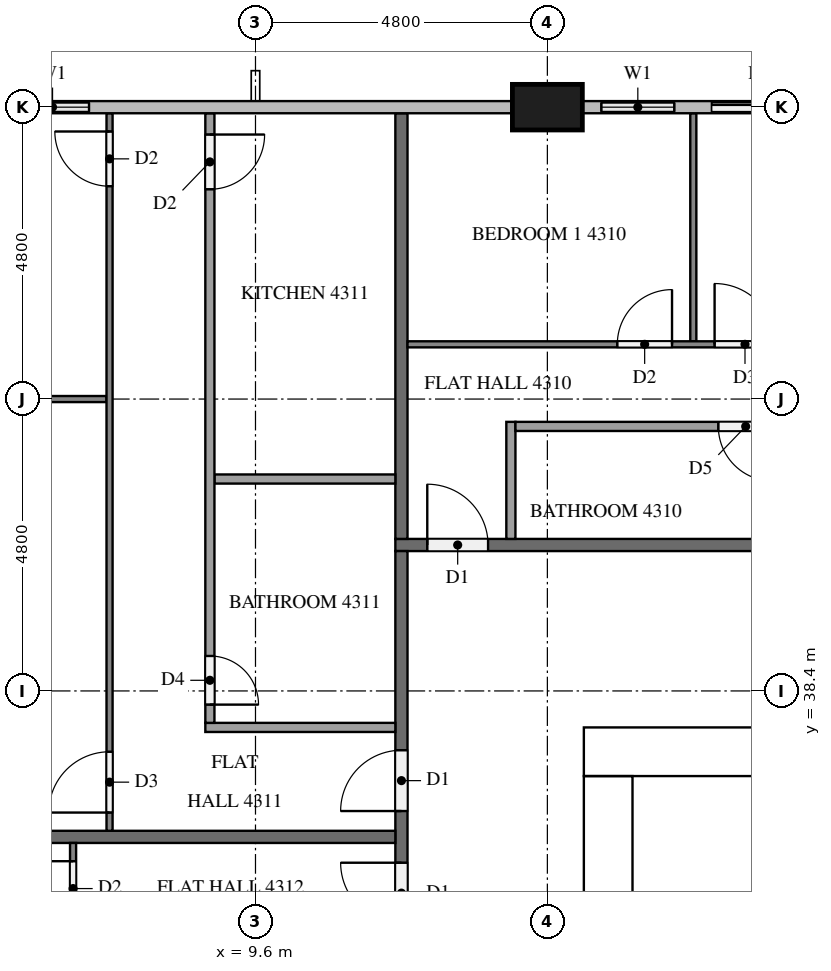
"""IFC4 building model, lengths in metres.
Left out: names, types, materials, properties, quantities, classifications, styles, units other than length and angle.
Written with IfcOpenShell. Run it as: python <this file> out.ifc"""

import sys

from ifc_helpers import new_model, si_unit, direction, frame, frame_2d, origin, origin_2d, place, context, subcontext, project, spatial, rectangle, extrude, element, fill, save


model = new_model("IFC4")
c1 = context("Model", 3, precision=1e-05, world=origin(), true_north=direction((0.0, 1.0)))
c2 = subcontext(c1, "Body", "Model", "MODEL_VIEW")
j1 = project(units=[si_unit("LENGTHUNIT", "METRE"), si_unit("PLANEANGLEUNIT", "RADIAN")], contexts=[c1])
p1 = place(None, origin())
s1 = spatial("IfcSite", under=j1, at=p1, CompositionType="ELEMENT")
p2 = place(p1, origin())
s2 = spatial("IfcBuilding", under=s1, at=p2, CompositionType="ELEMENT")
p3 = place(p2, frame((0.0, 0.0, 166.5)))
s3 = spatial("IfcBuildingStorey", under=s2, at=p3, CompositionType="ELEMENT", Elevation=166.5)
p4 = place(p3, frame((15.0, 37.4, 0.0), z_axis=(0.0, 0.0, 1.0), x_axis=(1.0, 0.0, 0.0)))
e1 = element("IfcWall", 1, at=p4, inside=s3, PredefinedType="SHEAR", context=c2, shape_type="SweptSolid", body=[
    extrude(rectangle(XDim=32.4, YDim=0.8, at=frame_2d((16.2, 0.0))), origin(), (0.0, 0.0, 1.0), 3.2),
])
p5 = place(p4, frame((15.3, 0.0, 0.0)))
e2 = element("IfcOpeningElement", 2, at=p5, cuts=e1, PredefinedType="OPENING", context=c2, shape_type="SweptSolid", body=[
    extrude(rectangle(XDim=1.8, YDim=2.1, at=frame_2d((0.9, 1.05))), frame((0.0, 0.41, 0.0), z_axis=(0.0, -1.0, 0.0), x_axis=(1.0, 0.0, 0.0)), (0.0, 0.0, 1.0), 0.82),
])
p6 = place(p4, frame((1.51, 0.0, 0.0)))
e3 = element("IfcOpeningElement", 3, at=p6, cuts=e1, PredefinedType="OPENING", context=c2, shape_type="SweptSolid", body=[
    extrude(rectangle(XDim=1.0, YDim=2.1, at=frame_2d((0.5, 1.05))), frame((0.0, 0.41, 0.0), z_axis=(0.0, -1.0, 0.0), x_axis=(1.0, 0.0, 0.0)), (0.0, 0.0, 1.0), 0.82),
])
p7 = place(p4, frame((5.11, 0.0, 0.0)))
e4 = element("IfcOpeningElement", 4, at=p7, cuts=e1, PredefinedType="OPENING", context=c2, shape_type="SweptSolid", body=[
    extrude(rectangle(XDim=1.0, YDim=2.1, at=frame_2d((0.5, 1.05))), frame((0.0, 0.41, 0.0), z_axis=(0.0, -1.0, 0.0), x_axis=(1.0, 0.0, 0.0)), (0.0, 0.0, 1.0), 0.82),
])
p8 = place(p3, frame((15.4, 15.8, 0.0), z_axis=(0.0, 0.0, 1.0), x_axis=(0.0, 1.0, 0.0)))
e5 = element("IfcWall", 5, at=p8, inside=s3, PredefinedType="SHEAR", context=c2, shape_type="SweptSolid", body=[
    extrude(rectangle(XDim=21.2, YDim=0.8, at=frame_2d((10.6, 0.0))), origin(), (0.0, 0.0, 1.0), 3.2),
])
p9 = place(p8, frame((4.96, 0.0, 0.0)))
e6 = element("IfcOpeningElement", 6, at=p9, cuts=e5, PredefinedType="OPENING", context=c2, shape_type="SweptSolid", body=[
    extrude(rectangle(XDim=1.2, YDim=2.1, at=frame_2d((0.6, 1.05))), frame((0.0, 0.41, 0.0), z_axis=(0.0, -1.0, 0.0), x_axis=(1.0, 0.0, 0.0)), (0.0, 0.0, 1.0), 0.82),
])
p10 = place(p3, frame((14.4, 48.0, 0.0), z_axis=(0.0, 0.0, 1.0), x_axis=(1.0, 0.0, 0.0)))
e7 = element("IfcColumn", 7, at=p10, inside=s3, PredefinedType="COLUMN", context=c2, shape_type="SweptSolid", body=[
    extrude(rectangle(XDim=1.15, YDim=0.75, at=origin_2d()), origin(), (0.0, 0.0, 1.0), 3.2),
])
p11 = place(p3, frame((19.2, 48.0, 0.0), z_axis=(0.0, 0.0, 1.0), x_axis=(-1.0, 0.0, 0.0)))
e8 = element("IfcWall", 8, at=p11, inside=s3, PredefinedType="SOLIDWALL", context=c2, shape_type="SweptSolid", body=[
    extrude(rectangle(XDim=4.225, YDim=0.15, at=frame_2d((2.112, 0.0))), origin(), (0.0, 0.0, 1.0), 3.2),
])
p12 = place(p11, frame((0.3, 0.0, 0.0)))
e9 = element("IfcOpeningElement", 9, at=p12, cuts=e8, PredefinedType="OPENING", context=c2, shape_type="SweptSolid", body=[
    extrude(rectangle(XDim=1.8, YDim=2.4, at=frame_2d((0.9, 1.2))), frame((0.0, 0.085, 0.0), z_axis=(0.0, -1.0, 0.0), x_axis=(1.0, 0.0, 0.0)), (0.0, 0.0, 1.0), 0.17),
])
p13 = place(p11, frame((2.712, 0.0, 0.9)))
e10 = element("IfcOpeningElement", 10, at=p13, cuts=e8, PredefinedType="OPENING", context=c2, shape_type="SweptSolid", body=[
    extrude(rectangle(XDim=1.2, YDim=1.4, at=frame_2d((0.6, 0.7))), frame((0.0, 0.085, 0.0), z_axis=(0.0, -1.0, 0.0), x_axis=(1.0, 0.0, 0.0)), (0.0, 0.0, 1.0), 0.17),
])
p14 = place(p3, frame((7.2, 48.0, 0.0), z_axis=(0.0, 0.0, 1.0), x_axis=(-1.0, 0.0, 0.0)))
e11 = element("IfcWall", 11, at=p14, inside=s3, PredefinedType="SOLIDWALL", context=c2, shape_type="SweptSolid", body=[
    extrude(rectangle(XDim=1.875, YDim=0.15, at=frame_2d((0.938, 0.0))), origin(), (0.0, 0.0, 1.0), 3.2),
])
p15 = place(p14, frame((0.337, 0.0, 0.9)))
e12 = element("IfcOpeningElement", 12, at=p15, cuts=e11, PredefinedType="OPENING", context=c2, shape_type="SweptSolid", body=[
    extrude(rectangle(XDim=1.2, YDim=1.4, at=frame_2d((0.6, 0.7))), frame((0.0, 0.085, 0.0), z_axis=(0.0, -1.0, 0.0), x_axis=(1.0, 0.0, 0.0)), (0.0, 0.0, 1.0), 0.17),
])
p16 = place(p3, frame((11.9, 40.8, 0.0), z_axis=(0.0, 0.0, 1.0), x_axis=(1.0, 0.0, 0.0)))
e13 = element("IfcWall", 13, at=p16, inside=s3, PredefinedType="PARTITIONING", context=c2, shape_type="SweptSolid", body=[
    extrude(rectangle(XDim=38.6, YDim=0.2, at=frame_2d((19.3, 0.0))), origin(), (0.0, 0.0, 1.0), 3.2),
])
p17 = place(p16, frame((31.725, 0.0, 0.0)))
e14 = element("IfcOpeningElement", 14, at=p17, cuts=e13, PredefinedType="OPENING", context=c2, shape_type="SweptSolid", body=[
    extrude(rectangle(XDim=1.0, YDim=2.1, at=frame_2d((0.5, 1.05))), frame((0.0, 0.11, 0.0), z_axis=(0.0, -1.0, 0.0), x_axis=(1.0, 0.0, 0.0)), (0.0, 0.0, 1.0), 0.22),
])
p18 = place(p16, frame((17.325, 0.0, 0.0)))
e15 = element("IfcOpeningElement", 15, at=p18, cuts=e13, PredefinedType="OPENING", context=c2, shape_type="SweptSolid", body=[
    extrude(rectangle(XDim=1.0, YDim=2.1, at=frame_2d((0.5, 1.05))), frame((0.0, 0.11, 0.0), z_axis=(0.0, -1.0, 0.0), x_axis=(1.0, 0.0, 0.0)), (0.0, 0.0, 1.0), 0.22),
])
p19 = place(p16, frame((0.525, 0.0, 0.0)))
e16 = element("IfcOpeningElement", 16, at=p19, cuts=e13, PredefinedType="OPENING", context=c2, shape_type="SweptSolid", body=[
    extrude(rectangle(XDim=1.0, YDim=2.1, at=frame_2d((0.5, 1.05))), frame((0.0, 0.11, 0.0), z_axis=(0.0, -1.0, 0.0), x_axis=(1.0, 0.0, 0.0)), (0.0, 0.0, 1.0), 0.22),
])
p20 = place(p3, frame((12.0, 12.1, 0.0), z_axis=(0.0, 0.0, 1.0), x_axis=(0.0, 1.0, 0.0)))
e17 = element("IfcWall", 17, at=p20, inside=s3, PredefinedType="PARTITIONING", context=c2, shape_type="SweptSolid", body=[
    extrude(rectangle(XDim=28.6, YDim=0.2, at=frame_2d((14.3, 0.0))), origin(), (0.0, 0.0, 1.0), 3.2),
])
p21 = place(p20, frame((24.325, 0.0, 0.0)))
e18 = element("IfcOpeningElement", 18, at=p21, cuts=e17, PredefinedType="OPENING", context=c2, shape_type="SweptSolid", body=[
    extrude(rectangle(XDim=1.0, YDim=2.1, at=frame_2d((0.5, 1.05))), frame((0.0, 0.11, 0.0), z_axis=(0.0, -1.0, 0.0), x_axis=(1.0, 0.0, 0.0)), (0.0, 0.0, 1.0), 0.22),
])
p22 = place(p20, frame((22.475, 0.0, 0.0)))
e19 = element("IfcOpeningElement", 19, at=p22, cuts=e17, PredefinedType="OPENING", context=c2, shape_type="SweptSolid", body=[
    extrude(rectangle(XDim=1.0, YDim=2.1, at=frame_2d((0.5, 1.05))), frame((0.0, 0.11, 0.0), z_axis=(0.0, -1.0, 0.0), x_axis=(1.0, 0.0, 0.0)), (0.0, 0.0, 1.0), 0.22),
])
p23 = place(p20, frame((0.325, 0.0, 0.0)))
e20 = element("IfcOpeningElement", 20, at=p23, cuts=e17, PredefinedType="OPENING", context=c2, shape_type="SweptSolid", body=[
    extrude(rectangle(XDim=1.0, YDim=2.1, at=frame_2d((0.5, 1.05))), frame((0.0, 0.11, 0.0), z_axis=(0.0, -1.0, 0.0), x_axis=(1.0, 0.0, 0.0)), (0.0, 0.0, 1.0), 0.22),
])
p24 = place(p3, frame((12.0, 47.9, 0.0), z_axis=(0.0, 0.0, 1.0), x_axis=(0.0, -1.0, 0.0)))
e21 = element("IfcWall", 21, at=p24, inside=s3, PredefinedType="PARTITIONING", context=c2, shape_type="SweptSolid", body=[
    extrude(rectangle(XDim=7.0, YDim=0.2, at=frame_2d((3.5, 0.0))), origin(), (0.0, 0.0, 1.0), 3.2),
])
p25 = place(p3, frame((0.1, 36.0, 0.0), z_axis=(0.0, 0.0, 1.0), x_axis=(1.0, 0.0, 0.0)))
e22 = element("IfcWall", 22, at=p25, inside=s3, PredefinedType="PARTITIONING", context=c2, shape_type="SweptSolid", body=[
    extrude(rectangle(XDim=11.8, YDim=0.2, at=frame_2d((5.9, 0.0))), origin(), (0.0, 0.0, 1.0), 3.2),
])
p26 = place(p3, frame((16.8, 44.15, 0.0), z_axis=(0.0, 0.0, 1.0), x_axis=(0.0, 1.0, 0.0)))
e23 = element("IfcWall", 23, at=p26, inside=s3, PredefinedType="PARTITIONING", context=c2, shape_type="SweptSolid", body=[
    extrude(rectangle(XDim=3.75, YDim=0.1, at=frame_2d((1.875, 0.0))), origin(), (0.0, 0.0, 1.0), 3.2),
])
p27 = place(p3, frame((12.1, 44.1, 0.0), z_axis=(0.0, 0.0, 1.0), x_axis=(1.0, 0.0, 0.0)))
e24 = element("IfcWall", 24, at=p27, inside=s3, PredefinedType="PARTITIONING", context=c2, shape_type="SweptSolid", body=[
    extrude(rectangle(XDim=16.6, YDim=0.1, at=frame_2d((8.3, 0.0))), origin(), (0.0, 0.0, 1.0), 3.2),
])
p28 = place(p27, frame((3.45, 0.0, 0.0)))
e25 = element("IfcOpeningElement", 25, at=p28, cuts=e24, PredefinedType="OPENING", context=c2, shape_type="SweptSolid", body=[
    extrude(rectangle(XDim=0.9, YDim=2.1, at=frame_2d((0.45, 1.05))), frame((0.0, 0.06, 0.0), z_axis=(0.0, -1.0, 0.0), x_axis=(1.0, 0.0, 0.0)), (0.0, 0.0, 1.0), 0.12),
])
p29 = place(p27, frame((5.05, 0.0, 0.0)))
e26 = element("IfcOpeningElement", 26, at=p29, cuts=e24, PredefinedType="OPENING", context=c2, shape_type="SweptSolid", body=[
    extrude(rectangle(XDim=1.0, YDim=2.1, at=frame_2d((0.5, 1.05))), frame((0.0, 0.06, 0.0), z_axis=(0.0, -1.0, 0.0), x_axis=(1.0, 0.0, 0.0)), (0.0, 0.0, 1.0), 0.12),
])
p30 = place(p27, frame((15.4, 0.0, 0.0)))
e27 = element("IfcOpeningElement", 27, at=p30, cuts=e24, PredefinedType="OPENING", context=c2, shape_type="SweptSolid", body=[
    extrude(rectangle(XDim=0.9, YDim=2.1, at=frame_2d((0.45, 1.05))), frame((0.0, 0.06, 0.0), z_axis=(0.0, -1.0, 0.0), x_axis=(1.0, 0.0, 0.0)), (0.0, 0.0, 1.0), 0.12),
])
p31 = place(p3, frame((13.8, 40.9, 0.0), z_axis=(0.0, 0.0, 1.0), x_axis=(0.0, 1.0, 0.0)))
e28 = element("IfcWall", 28, at=p31, inside=s3, PredefinedType="PARTITIONING", context=c2, shape_type="SweptSolid", body=[
    extrude(rectangle(XDim=1.925, YDim=0.15, at=frame_2d((0.962, 0.0))), origin(), (0.0, 0.0, 1.0), 3.2),
])
p32 = place(p3, frame((28.7, 42.75, 0.0), z_axis=(0.0, 0.0, 1.0), x_axis=(-1.0, 0.0, 0.0)))
e29 = element("IfcWall", 29, at=p32, inside=s3, PredefinedType="PARTITIONING", context=c2, shape_type="SweptSolid", body=[
    extrude(rectangle(XDim=14.825, YDim=0.15, at=frame_2d((7.413, 0.0))), origin(), (0.0, 0.0, 1.0), 3.2),
])
p33 = place(p32, frame((10.588, 0.0, 0.0)))
e30 = element("IfcOpeningElement", 30, at=p33, cuts=e29, PredefinedType="OPENING", context=c2, shape_type="SweptSolid", body=[
    extrude(rectangle(XDim=0.9, YDim=2.1, at=frame_2d((0.45, 1.05))), frame((0.0, 0.085, 0.0), z_axis=(0.0, -1.0, 0.0), x_axis=(1.0, 0.0, 0.0)), (0.0, 0.0, 1.0), 0.17),
])
p34 = place(p32, frame((9.138, 0.0, 0.0)))
e31 = element("IfcOpeningElement", 31, at=p34, cuts=e29, PredefinedType="OPENING", context=c2, shape_type="SweptSolid", body=[
    extrude(rectangle(XDim=0.8, YDim=2.1, at=frame_2d((0.4, 1.05))), frame((0.0, 0.085, 0.0), z_axis=(0.0, -1.0, 0.0), x_axis=(1.0, 0.0, 0.0)), (0.0, 0.0, 1.0), 0.17),
])
p35 = place(p32, frame((0.35, 0.0, 0.0)))
e32 = element("IfcOpeningElement", 32, at=p35, cuts=e29, PredefinedType="OPENING", context=c2, shape_type="SweptSolid", body=[
    extrude(rectangle(XDim=0.9, YDim=2.1, at=frame_2d((0.45, 1.05))), frame((0.0, 0.085, 0.0), z_axis=(0.0, -1.0, 0.0), x_axis=(1.0, 0.0, 0.0)), (0.0, 0.0, 1.0), 0.17),
])
p36 = place(p3, frame((7.15, 43.2, 0.0), z_axis=(0.0, 0.0, 1.0), x_axis=(-1.0, 0.0, 0.0)))
e33 = element("IfcWall", 33, at=p36, inside=s3, PredefinedType="PARTITIONING", context=c2, shape_type="SweptSolid", body=[
    extrude(rectangle(XDim=6.625, YDim=0.1, at=frame_2d((3.312, 0.0))), origin(), (0.0, 0.0, 1.0), 3.2),
])
p37 = place(p3, frame((7.2, 36.1, 0.0), z_axis=(0.0, 0.0, 1.0), x_axis=(0.0, 1.0, 0.0)))
e34 = element("IfcWall", 34, at=p37, inside=s3, PredefinedType="PARTITIONING", context=c2, shape_type="SweptSolid", body=[
    extrude(rectangle(XDim=11.8, YDim=0.1, at=frame_2d((5.9, 0.0))), origin(), (0.0, 0.0, 1.0), 3.2),
])
p38 = place(p37, frame((0.3, 0.0, 0.0)))
e35 = element("IfcOpeningElement", 35, at=p38, cuts=e34, PredefinedType="OPENING", context=c2, shape_type="SweptSolid", body=[
    extrude(rectangle(XDim=1.0, YDim=2.1, at=frame_2d((0.5, 1.05))), frame((0.0, 0.06, 0.0), z_axis=(0.0, -1.0, 0.0), x_axis=(1.0, 0.0, 0.0)), (0.0, 0.0, 1.0), 0.12),
])
p39 = place(p37, frame((10.6, 0.0, 0.0)))
e36 = element("IfcOpeningElement", 36, at=p39, cuts=e34, PredefinedType="OPENING", context=c2, shape_type="SweptSolid", body=[
    extrude(rectangle(XDim=0.9, YDim=2.1, at=frame_2d((0.45, 1.05))), frame((0.0, 0.06, 0.0), z_axis=(0.0, -1.0, 0.0), x_axis=(1.0, 0.0, 0.0)), (0.0, 0.0, 1.0), 0.12),
])
p40 = place(p3, frame((11.9, 41.885, 0.0), z_axis=(0.0, 0.0, 1.0), x_axis=(-1.0, 0.0, 0.0)))
e37 = element("IfcWall", 37, at=p40, inside=s3, PredefinedType="PARTITIONING", context=c2, shape_type="SweptSolid", body=[
    extrude(rectangle(XDim=2.975, YDim=0.15, at=frame_2d((1.487, 0.0))), origin(), (0.0, 0.0, 1.0), 3.2),
])
p41 = place(p3, frame((11.9, 37.8, 0.0), z_axis=(0.0, 0.0, 1.0), x_axis=(-1.0, 0.0, 0.0)))
e38 = element("IfcWall", 38, at=p41, inside=s3, PredefinedType="PARTITIONING", context=c2, shape_type="SweptSolid", body=[
    extrude(rectangle(XDim=3.125, YDim=0.15, at=frame_2d((1.562, 0.0))), origin(), (0.0, 0.0, 1.0), 3.2),
])
p42 = place(p3, frame((8.85, 47.9, 0.0), z_axis=(0.0, 0.0, 1.0), x_axis=(0.0, -1.0, 0.0)))
e39 = element("IfcWall", 39, at=p42, inside=s3, PredefinedType="PARTITIONING", context=c2, shape_type="SweptSolid", body=[
    extrude(rectangle(XDim=10.025, YDim=0.15, at=frame_2d((5.012, 0.0))), origin(), (0.0, 0.0, 1.0), 3.2),
])
p43 = place(p42, frame((8.925, 0.0, 0.0)))
e40 = element("IfcOpeningElement", 40, at=p43, cuts=e39, PredefinedType="OPENING", context=c2, shape_type="SweptSolid", body=[
    extrude(rectangle(XDim=0.8, YDim=2.1, at=frame_2d((0.4, 1.05))), frame((0.0, 0.085, 0.0), z_axis=(0.0, -1.0, 0.0), x_axis=(1.0, 0.0, 0.0)), (0.0, 0.0, 1.0), 0.17),
])
p44 = place(p42, frame((0.35, 0.0, 0.0)))
e41 = element("IfcOpeningElement", 41, at=p44, cuts=e39, PredefinedType="OPENING", context=c2, shape_type="SweptSolid", body=[
    extrude(rectangle(XDim=0.9, YDim=2.1, at=frame_2d((0.45, 1.05))), frame((0.0, 0.085, 0.0), z_axis=(0.0, -1.0, 0.0), x_axis=(1.0, 0.0, 0.0)), (0.0, 0.0, 1.0), 0.17),
])
p45 = place(p3, frame((6.6, 26.5, 0.0), z_axis=(0.0, 0.0, 1.0), x_axis=(0.0, 1.0, 0.0)))
e42 = element("IfcWall", 42, at=p45, inside=s3, PredefinedType="PARTITIONING", context=c2, shape_type="SweptSolid", body=[
    extrude(rectangle(XDim=9.4, YDim=0.1, at=frame_2d((4.7, 0.0))), origin(), (0.0, 0.0, 1.0), 3.2),
])
p46 = place(p45, frame((8.2, 0.0, 0.0)))
e43 = element("IfcOpeningElement", 43, at=p46, cuts=e42, PredefinedType="OPENING", context=c2, shape_type="SweptSolid", body=[
    extrude(rectangle(XDim=0.9, YDim=2.1, at=frame_2d((0.45, 1.05))), frame((0.0, 0.06, 0.0), z_axis=(0.0, -1.0, 0.0), x_axis=(1.0, 0.0, 0.0)), (0.0, 0.0, 1.0), 0.12),
])
p47 = place(p45, frame((0.3, 0.0, 0.0)))
e44 = element("IfcOpeningElement", 44, at=p47, cuts=e42, PredefinedType="OPENING", context=c2, shape_type="SweptSolid", body=[
    extrude(rectangle(XDim=1.0, YDim=2.1, at=frame_2d((0.5, 1.05))), frame((0.0, 0.06, 0.0), z_axis=(0.0, -1.0, 0.0), x_axis=(1.0, 0.0, 0.0)), (0.0, 0.0, 1.0), 0.12),
])
p48 = place(p12, origin())
e45 = element("IfcDoor", 45, at=p48, inside=s3, OperationType="SLIDING_TO_RIGHT", PredefinedType="DOOR", context=c2, shape_type="SweptSolid", body=[
    extrude(rectangle(XDim=1.8, YDim=2.4, at=frame_2d((0.9, 1.2))), frame((0.0, 0.025, 0.0), z_axis=(0.0, -1.0, 0.0), x_axis=(1.0, 0.0, 0.0)), (0.0, 0.0, 1.0), 0.05),
])
fill(e9, e45)
p49 = place(p13, origin())
e46 = element("IfcWindow", 46, at=p49, inside=s3, PartitioningType="SINGLE_PANEL", PredefinedType="WINDOW", context=c2, shape_type="SweptSolid", body=[
    extrude(rectangle(XDim=1.2, YDim=1.4, at=frame_2d((0.6, 0.7))), frame((0.0, 0.03, 0.0), z_axis=(0.0, -1.0, 0.0), x_axis=(1.0, 0.0, 0.0)), (0.0, 0.0, 1.0), 0.06),
])
fill(e10, e46)
p50 = place(p15, origin())
e47 = element("IfcWindow", 47, at=p50, inside=s3, PartitioningType="SINGLE_PANEL", PredefinedType="WINDOW", context=c2, shape_type="SweptSolid", body=[
    extrude(rectangle(XDim=1.2, YDim=1.4, at=frame_2d((0.6, 0.7))), frame((0.0, 0.03, 0.0), z_axis=(0.0, -1.0, 0.0), x_axis=(1.0, 0.0, 0.0)), (0.0, 0.0, 1.0), 0.06),
])
fill(e12, e47)
p51 = place(p6, origin())
e48 = element("IfcDoor", 48, at=p51, inside=s3, OperationType="SINGLE_SWING_RIGHT", PredefinedType="DOOR", context=c2, shape_type="SweptSolid", body=[
    extrude(rectangle(XDim=1.0, YDim=2.1, at=frame_2d((0.5, 1.05))), frame((0.0, 0.025, 0.0), z_axis=(0.0, -1.0, 0.0), x_axis=(1.0, 0.0, 0.0)), (0.0, 0.0, 1.0), 0.05),
])
fill(e3, e48)
p52 = place(p19, origin())
e49 = element("IfcDoor", 49, at=p52, inside=s3, OperationType="SINGLE_SWING_LEFT", PredefinedType="DOOR", context=c2, shape_type="SweptSolid", body=[
    extrude(rectangle(XDim=1.0, YDim=2.1, at=frame_2d((0.5, 1.05))), frame((0.0, 0.025, 0.0), z_axis=(0.0, -1.0, 0.0), x_axis=(1.0, 0.0, 0.0)), (0.0, 0.0, 1.0), 0.05),
])
fill(e16, e49)
p53 = place(p21, origin())
e50 = element("IfcDoor", 50, at=p53, inside=s3, OperationType="SINGLE_SWING_LEFT", PredefinedType="DOOR", context=c2, shape_type="SweptSolid", body=[
    extrude(rectangle(XDim=1.0, YDim=2.1, at=frame_2d((0.5, 1.05))), frame((0.0, 0.025, 0.0), z_axis=(0.0, -1.0, 0.0), x_axis=(1.0, 0.0, 0.0)), (0.0, 0.0, 1.0), 0.05),
])
fill(e18, e50)
p54 = place(p22, origin())
e51 = element("IfcDoor", 51, at=p54, inside=s3, OperationType="SINGLE_SWING_RIGHT", PredefinedType="DOOR", context=c2, shape_type="SweptSolid", body=[
    extrude(rectangle(XDim=1.0, YDim=2.1, at=frame_2d((0.5, 1.05))), frame((0.0, 0.025, 0.0), z_axis=(0.0, -1.0, 0.0), x_axis=(1.0, 0.0, 0.0)), (0.0, 0.0, 1.0), 0.05),
])
fill(e19, e51)
p55 = place(p28, origin())
e52 = element("IfcDoor", 52, at=p55, inside=s3, OperationType="SINGLE_SWING_RIGHT", PredefinedType="DOOR", context=c2, shape_type="SweptSolid", body=[
    extrude(rectangle(XDim=0.9, YDim=2.1, at=frame_2d((0.45, 1.05))), frame((0.0, 0.025, 0.0), z_axis=(0.0, -1.0, 0.0), x_axis=(1.0, 0.0, 0.0)), (0.0, 0.0, 1.0), 0.05),
])
fill(e25, e52)
p56 = place(p29, origin())
e53 = element("IfcDoor", 53, at=p56, inside=s3, OperationType="SINGLE_SWING_LEFT", PredefinedType="DOOR", context=c2, shape_type="SweptSolid", body=[
    extrude(rectangle(XDim=1.0, YDim=2.1, at=frame_2d((0.5, 1.05))), frame((0.0, 0.025, 0.0), z_axis=(0.0, -1.0, 0.0), x_axis=(1.0, 0.0, 0.0)), (0.0, 0.0, 1.0), 0.05),
])
fill(e26, e53)
p57 = place(p33, origin())
e54 = element("IfcDoor", 54, at=p57, inside=s3, OperationType="SINGLE_SWING_LEFT", PredefinedType="DOOR", context=c2, shape_type="SweptSolid", body=[
    extrude(rectangle(XDim=0.9, YDim=2.1, at=frame_2d((0.45, 1.05))), frame((0.0, 0.025, 0.0), z_axis=(0.0, -1.0, 0.0), x_axis=(1.0, 0.0, 0.0)), (0.0, 0.0, 1.0), 0.05),
])
fill(e30, e54)
p58 = place(p38, origin())
e55 = element("IfcDoor", 55, at=p58, inside=s3, OperationType="SINGLE_SWING_LEFT", PredefinedType="DOOR", context=c2, shape_type="SweptSolid", body=[
    extrude(rectangle(XDim=1.0, YDim=2.1, at=frame_2d((0.5, 1.05))), frame((0.0, 0.025, 0.0), z_axis=(0.0, -1.0, 0.0), x_axis=(1.0, 0.0, 0.0)), (0.0, 0.0, 1.0), 0.05),
])
fill(e35, e55)
p59 = place(p39, origin())
e56 = element("IfcDoor", 56, at=p59, inside=s3, OperationType="SINGLE_SWING_RIGHT", PredefinedType="DOOR", context=c2, shape_type="SweptSolid", body=[
    extrude(rectangle(XDim=0.9, YDim=2.1, at=frame_2d((0.45, 1.05))), frame((0.0, 0.025, 0.0), z_axis=(0.0, -1.0, 0.0), x_axis=(1.0, 0.0, 0.0)), (0.0, 0.0, 1.0), 0.05),
])
fill(e36, e56)
p60 = place(p43, origin())
e57 = element("IfcDoor", 57, at=p60, inside=s3, OperationType="SINGLE_SWING_RIGHT", PredefinedType="DOOR", context=c2, shape_type="SweptSolid", body=[
    extrude(rectangle(XDim=0.8, YDim=2.1, at=frame_2d((0.4, 1.05))), frame((0.0, 0.025, 0.0), z_axis=(0.0, -1.0, 0.0), x_axis=(1.0, 0.0, 0.0)), (0.0, 0.0, 1.0), 0.05),
])
fill(e40, e57)
p61 = place(p44, origin())
e58 = element("IfcDoor", 58, at=p61, inside=s3, OperationType="SINGLE_SWING_LEFT", PredefinedType="DOOR", context=c2, shape_type="SweptSolid", body=[
    extrude(rectangle(XDim=0.9, YDim=2.1, at=frame_2d((0.45, 1.05))), frame((0.0, 0.025, 0.0), z_axis=(0.0, -1.0, 0.0), x_axis=(1.0, 0.0, 0.0)), (0.0, 0.0, 1.0), 0.05),
])
fill(e41, e58)
p62 = place(p46, origin())
e59 = element("IfcDoor", 59, at=p62, inside=s3, OperationType="SINGLE_SWING_RIGHT", PredefinedType="DOOR", context=c2, shape_type="SweptSolid", body=[
    extrude(rectangle(XDim=0.9, YDim=2.1, at=frame_2d((0.45, 1.05))), frame((0.0, 0.025, 0.0), z_axis=(0.0, -1.0, 0.0), x_axis=(1.0, 0.0, 0.0)), (0.0, 0.0, 1.0), 0.05),
])
fill(e43, e59)
save(model, sys.argv[1])
